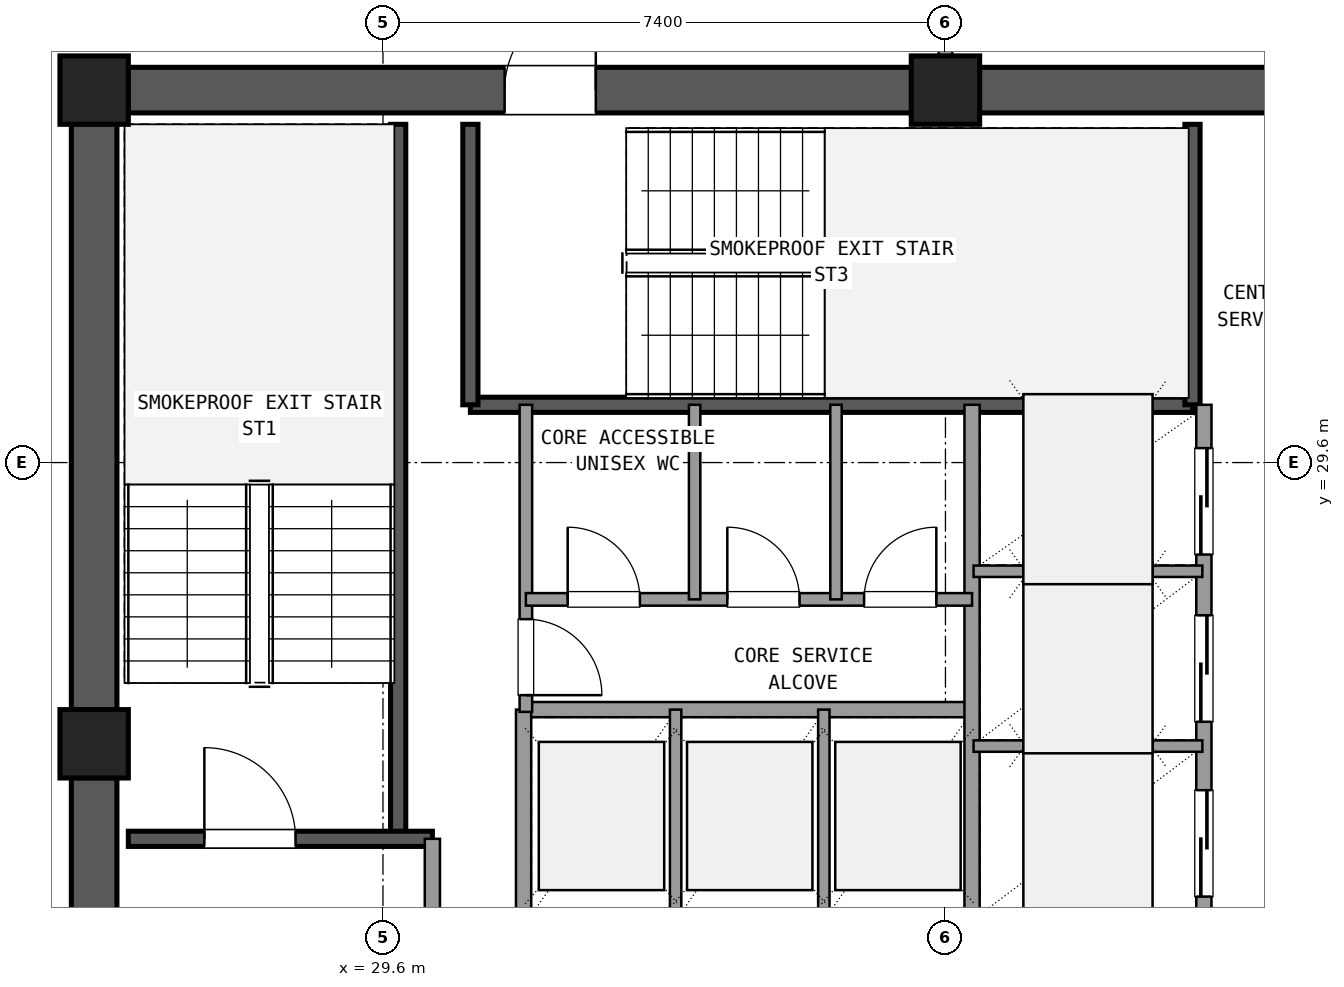
"""IFC4 building model, lengths in metres.
Left out: names, types, materials, properties, quantities, classifications, styles, units other than length and angle.
Written with IfcOpenShell. Run it as: python <this file> out.ifc"""

import sys

from ifc_helpers import new_model, si_unit, direction, frame, frame_2d, origin, origin_2d, place, context, subcontext, project, spatial, rectangle, extrude, element, fill, save


model = new_model("IFC4")
c1 = context("Model", 3, precision=1e-05, world=origin(), true_north=direction((0.0, 1.0)))
c2 = subcontext(c1, "Body", "Model", "MODEL_VIEW")
j1 = project(units=[si_unit("LENGTHUNIT", "METRE"), si_unit("PLANEANGLEUNIT", "RADIAN")], contexts=[c1])
p1 = place(None, origin())
s1 = spatial("IfcSite", under=j1, at=p1, CompositionType="ELEMENT")
p2 = place(p1, origin())
s2 = spatial("IfcBuilding", under=s1, at=p2, CompositionType="ELEMENT")
p3 = place(p2, frame((0.0, 0.0, 217.98)))
s3 = spatial("IfcBuildingStorey", under=s2, at=p3, CompositionType="ELEMENT", Elevation=217.98)
for number, where, z_axis, x_axis in (
    (1, (37.0, 34.5, 0.0), (0.0, 0.0, 1.0), (1.0, 0.0, 0.0)),
    (2, (25.8, 34.5, 0.0), (0.0, 0.0, 1.0), (1.0, 0.0, 0.0)),
    (3, (25.8, 25.9, 0.0), (0.0, 0.0, 1.0), (1.0, 0.0, 0.0)),
):
    element("IfcColumn", number, at=place(p3, frame(where, z_axis=z_axis, x_axis=x_axis)), inside=s3, PredefinedType="COLUMN", context=c2, shape_type="SweptSolid", body=[
        extrude(rectangle(XDim=0.9, YDim=0.9, at=origin_2d()), origin(), (0.0, 0.0, 1.0), 3.6),
    ])
p4 = place(p3, frame((47.755, 34.5, 0.0), z_axis=(0.0, 0.0, 1.0), x_axis=(-1.0, 0.0, 0.0)))
e4 = element("IfcWall", 4, at=p4, inside=s3, PredefinedType="SHEAR", context=c2, shape_type="SweptSolid", body=[
    extrude(rectangle(XDim=10.31, YDim=0.6, at=frame_2d((5.155, 0.0))), origin(), (0.0, 0.0, 1.0), 3.32),
])
p5 = place(p4, frame((4.655, 0.0, 0.0)))
e5 = element("IfcOpeningElement", 5, at=p5, cuts=e4, PredefinedType="OPENING", context=c2, shape_type="SweptSolid", body=[
    extrude(rectangle(XDim=1.6, YDim=2.2, at=frame_2d((0.8, 1.1))), frame((0.0, 0.31, 0.0), z_axis=(0.0, -1.0, 0.0), x_axis=(1.0, 0.0, 0.0)), (0.0, 0.0, 1.0), 0.62),
])
p6 = place(p3, frame((36.555, 34.5, 0.0), z_axis=(0.0, 0.0, 1.0), x_axis=(-1.0, 0.0, 0.0)))
e6 = element("IfcWall", 6, at=p6, inside=s3, PredefinedType="SHEAR", context=c2, shape_type="SweptSolid", body=[
    extrude(rectangle(XDim=10.31, YDim=0.6, at=frame_2d((5.155, 0.0))), origin(), (0.0, 0.0, 1.0), 3.32),
])
p7 = place(p6, frame((4.155, 0.0, 0.0)))
e7 = element("IfcOpeningElement", 7, at=p7, cuts=e6, PredefinedType="OPENING", context=c2, shape_type="SweptSolid", body=[
    extrude(rectangle(XDim=1.2, YDim=2.15, at=frame_2d((0.6, 1.075))), frame((0.0, 0.31, 0.0), z_axis=(0.0, -1.0, 0.0), x_axis=(1.0, 0.0, 0.0)), (0.0, 0.0, 1.0), 0.62),
])
p8 = place(p3, frame((25.8, 34.055, 0.0), z_axis=(0.0, 0.0, 1.0), x_axis=(0.0, -1.0, 0.0)))
e8 = element("IfcWall", 8, at=p8, inside=s3, PredefinedType="SHEAR", context=c2, shape_type="SweptSolid", body=[
    extrude(rectangle(XDim=7.71, YDim=0.6, at=frame_2d((3.855, 0.0))), origin(), (0.0, 0.0, 1.0), 3.32),
])
p9 = place(p3, frame((25.8, 25.455, 0.0), z_axis=(0.0, 0.0, 1.0), x_axis=(0.0, -1.0, 0.0)))
e9 = element("IfcWall", 9, at=p9, inside=s3, PredefinedType="SHEAR", context=c2, shape_type="SweptSolid", body=[
    extrude(rectangle(XDim=7.71, YDim=0.6, at=frame_2d((3.855, 0.0))), origin(), (0.0, 0.0, 1.0), 3.32),
])
p10 = place(p9, frame((2.205, 0.0, 0.0)))
e10 = element("IfcOpeningElement", 10, at=p10, cuts=e9, PredefinedType="OPENING", context=c2, shape_type="SweptSolid", body=[
    extrude(rectangle(XDim=1.2, YDim=2.15, at=frame_2d((0.6, 1.075))), frame((0.0, 0.31, 0.0), z_axis=(0.0, -1.0, 0.0), x_axis=(1.0, 0.0, 0.0)), (0.0, 0.0, 1.0), 0.62),
])
p11 = place(p3, frame((29.8, 24.65, 0.0), z_axis=(0.0, 0.0, 1.0), x_axis=(0.0, 1.0, 0.0)))
e11 = element("IfcWall", 11, at=p11, inside=s3, PredefinedType="SHEAR", context=c2, shape_type="SweptSolid", body=[
    extrude(rectangle(XDim=9.4, YDim=0.2, at=frame_2d((4.7, 0.0))), origin(), (0.0, 0.0, 1.0), 3.32),
])
p12 = place(p3, frame((26.25, 24.65, 0.0), z_axis=(0.0, 0.0, 1.0), x_axis=(1.0, 0.0, 0.0)))
e12 = element("IfcWall", 12, at=p12, inside=s3, PredefinedType="SHEAR", context=c2, shape_type="SweptSolid", body=[
    extrude(rectangle(XDim=4.0, YDim=0.2, at=frame_2d((2.0, 0.0))), origin(), (0.0, 0.0, 1.0), 3.32),
])
p13 = place(p12, frame((1.0, 0.0, 0.0)))
e13 = element("IfcOpeningElement", 13, at=p13, cuts=e12, PredefinedType="OPENING", context=c2, shape_type="SweptSolid", body=[
    extrude(rectangle(XDim=1.2, YDim=2.15, at=frame_2d((0.6, 1.075))), frame((0.0, 0.11, 0.0), z_axis=(0.0, -1.0, 0.0), x_axis=(1.0, 0.0, 0.0)), (0.0, 0.0, 1.0), 0.22),
])
p14 = place(p3, frame((30.75, 30.36, 0.0), z_axis=(0.0, 0.0, 1.0), x_axis=(1.0, 0.0, 0.0)))
e14 = element("IfcWall", 14, at=p14, inside=s3, PredefinedType="SHEAR", context=c2, shape_type="SweptSolid", body=[
    extrude(rectangle(XDim=9.5, YDim=0.2, at=frame_2d((4.75, 0.0))), origin(), (0.0, 0.0, 1.0), 3.32),
])
for number, where, z_axis, x_axis in (
    (15, (30.75, 30.36, 0.0), (0.0, 0.0, 1.0), (0.0, 1.0, 0.0)),
    (16, (40.25, 30.36, 0.0), (0.0, 0.0, 1.0), (0.0, 1.0, 0.0)),
):
    element("IfcWall", number, at=place(p3, frame(where, z_axis=z_axis, x_axis=x_axis)), inside=s3, PredefinedType="SHEAR", context=c2, shape_type="SweptSolid", body=[
        extrude(rectangle(XDim=3.69, YDim=0.2, at=frame_2d((1.845, 0.0))), origin(), (0.0, 0.0, 1.0), 3.32),
    ])
p15 = place(p3, frame((30.25, 17.75, 0.0), z_axis=(0.0, 0.0, 1.0), x_axis=(0.0, 1.0, 0.0)))
e17 = element("IfcWall", 17, at=p15, inside=s3, PredefinedType="SOLIDWALL", context=c2, shape_type="SweptSolid", body=[
    extrude(rectangle(XDim=6.9, YDim=0.2, at=frame_2d((3.45, 0.0))), origin(), (0.0, 0.0, 1.0), 2.61),
])
p16 = place(p15, frame((4.15, 0.0, 0.0)))
e18 = element("IfcOpeningElement", 18, at=p16, cuts=e17, PredefinedType="OPENING", context=c2, shape_type="SweptSolid", body=[
    extrude(rectangle(XDim=1.2, YDim=2.15, at=frame_2d((0.6, 1.075))), frame((0.0, 0.11, 0.0), z_axis=(0.0, -1.0, 0.0), x_axis=(1.0, 0.0, 0.0)), (0.0, 0.0, 1.0), 0.22),
])
p17 = place(p3, frame((31.45, 26.35, 0.0), z_axis=(0.0, 0.0, 1.0), x_axis=(1.0, 0.0, 0.0)))
e19 = element("IfcWall", 19, at=p17, inside=s3, PredefinedType="SOLIDWALL", context=c2, shape_type="SweptSolid", body=[
    extrude(rectangle(XDim=5.9, YDim=0.2, at=frame_2d((2.95, 0.0))), origin(), (0.0, 0.0, 1.0), 2.61),
])
p18 = place(p3, frame((31.45, 23.54, 0.0), z_axis=(0.0, 0.0, 1.0), x_axis=(0.0, 1.0, 0.0)))
e20 = element("IfcWall", 20, at=p18, inside=s3, PredefinedType="SOLIDWALL", context=c2, shape_type="SweptSolid", body=[
    extrude(rectangle(XDim=2.81, YDim=0.2, at=frame_2d((1.405, 0.0))), origin(), (0.0, 0.0, 1.0), 2.61),
])
for number, where, z_axis, x_axis in (
    (21, (33.45, 23.54, 0.0), (0.0, 0.0, 1.0), (0.0, 1.0, 0.0)),
    (22, (35.4, 23.54, 0.0), (0.0, 0.0, 1.0), (0.0, 1.0, 0.0)),
):
    element("IfcWall", number, at=place(p3, frame(where, z_axis=z_axis, x_axis=x_axis)), inside=s3, PredefinedType="PARTITIONING", context=c2, shape_type="SweptSolid", body=[
        extrude(rectangle(XDim=2.81, YDim=0.15, at=frame_2d((1.405, 0.0))), origin(), (0.0, 0.0, 1.0), 2.61),
    ])
p19 = place(p3, frame((37.35, 23.54, 0.0), z_axis=(0.0, 0.0, 1.0), x_axis=(0.0, 1.0, 0.0)))
e23 = element("IfcWall", 23, at=p19, inside=s3, PredefinedType="SOLIDWALL", context=c2, shape_type="SweptSolid", body=[
    extrude(rectangle(XDim=6.82, YDim=0.2, at=frame_2d((3.41, 0.0))), origin(), (0.0, 0.0, 1.0), 2.61),
])
p20 = place(p3, frame((40.4, 23.54, 0.0), z_axis=(0.0, 0.0, 1.0), x_axis=(0.0, 1.0, 0.0)))
e24 = element("IfcWall", 24, at=p20, inside=s3, PredefinedType="SOLIDWALL", context=c2, shape_type="SweptSolid", body=[
    extrude(rectangle(XDim=6.82, YDim=0.2, at=frame_2d((3.41, 0.0))), origin(), (0.0, 0.0, 1.0), 2.61),
])
p21 = place(p20, frame((0.35, 0.0, 0.0)))
e25 = element("IfcOpeningElement", 25, at=p21, cuts=e24, PredefinedType="OPENING", context=c2, shape_type="SweptSolid", body=[
    extrude(rectangle(XDim=1.4, YDim=2.2, at=frame_2d((0.7, 1.1))), frame((0.0, 0.11, 0.0), z_axis=(0.0, -1.0, 0.0), x_axis=(1.0, 0.0, 0.0)), (0.0, 0.0, 1.0), 0.22),
])
p22 = place(p20, frame((2.65, 0.0, 0.0)))
e26 = element("IfcOpeningElement", 26, at=p22, cuts=e24, PredefinedType="OPENING", context=c2, shape_type="SweptSolid", body=[
    extrude(rectangle(XDim=1.4, YDim=2.2, at=frame_2d((0.7, 1.1))), frame((0.0, 0.11, 0.0), z_axis=(0.0, -1.0, 0.0), x_axis=(1.0, 0.0, 0.0)), (0.0, 0.0, 1.0), 0.22),
])
p23 = place(p20, frame((4.85, 0.0, 0.0)))
e27 = element("IfcOpeningElement", 27, at=p23, cuts=e24, PredefinedType="OPENING", context=c2, shape_type="SweptSolid", body=[
    extrude(rectangle(XDim=1.4, YDim=2.2, at=frame_2d((0.7, 1.1))), frame((0.0, 0.11, 0.0), z_axis=(0.0, -1.0, 0.0), x_axis=(1.0, 0.0, 0.0)), (0.0, 0.0, 1.0), 0.22),
])
for number, where, z_axis, x_axis in (
    (28, (37.37, 25.87, 0.0), (0.0, 0.0, 1.0), (1.0, 0.0, 0.0)),
    (29, (37.37, 28.17, 0.0), (0.0, 0.0, 1.0), (1.0, 0.0, 0.0)),
):
    element("IfcWall", number, at=place(p3, frame(where, z_axis=z_axis, x_axis=x_axis)), inside=s3, PredefinedType="PARTITIONING", context=c2, shape_type="SweptSolid", body=[
        extrude(rectangle(XDim=3.01, YDim=0.15, at=frame_2d((1.505, 0.0))), origin(), (0.0, 0.0, 1.0), 2.61),
    ])
p24 = place(p3, frame((31.48, 26.32, 0.0), z_axis=(0.0, 0.0, 1.0), x_axis=(0.0, 1.0, 0.0)))
e30 = element("IfcWall", 30, at=p24, inside=s3, PredefinedType="PLUMBINGWALL", context=c2, shape_type="SweptSolid", body=[
    extrude(rectangle(XDim=4.04, YDim=0.165, at=frame_2d((2.02, 0.0))), origin(), (0.0, 0.0, 1.0), 2.61),
])
p25 = place(p24, frame((0.22, 0.0, 0.0)))
e31 = element("IfcOpeningElement", 31, at=p25, cuts=e30, PredefinedType="OPENING", context=c2, shape_type="SweptSolid", body=[
    extrude(rectangle(XDim=1.0, YDim=2.15, at=frame_2d((0.5, 1.075))), frame((0.0, 0.093, 0.0), z_axis=(0.0, -1.0, 0.0), x_axis=(1.0, 0.0, 0.0)), (0.0, 0.0, 1.0), 0.185),
])
p26 = place(p3, frame((31.48, 27.8, 0.0), z_axis=(0.0, 0.0, 1.0), x_axis=(1.0, 0.0, 0.0)))
e32 = element("IfcWall", 32, at=p26, inside=s3, PredefinedType="PLUMBINGWALL", context=c2, shape_type="SweptSolid", body=[
    extrude(rectangle(XDim=5.87, YDim=0.165, at=frame_2d((2.935, 0.0))), origin(), (0.0, 0.0, 1.0), 2.61),
])
p27 = place(p26, frame((0.55, 0.0, 0.0)))
e33 = element("IfcOpeningElement", 33, at=p27, cuts=e32, PredefinedType="OPENING", context=c2, shape_type="SweptSolid", body=[
    extrude(rectangle(XDim=0.95, YDim=2.1, at=frame_2d((0.475, 1.05))), frame((0.0, 0.093, 0.0), z_axis=(0.0, -1.0, 0.0), x_axis=(1.0, 0.0, 0.0)), (0.0, 0.0, 1.0), 0.185),
])
p28 = place(p26, frame((2.65, 0.0, 0.0)))
e34 = element("IfcOpeningElement", 34, at=p28, cuts=e32, PredefinedType="OPENING", context=c2, shape_type="SweptSolid", body=[
    extrude(rectangle(XDim=0.95, YDim=2.1, at=frame_2d((0.475, 1.05))), frame((0.0, 0.093, 0.0), z_axis=(0.0, -1.0, 0.0), x_axis=(1.0, 0.0, 0.0)), (0.0, 0.0, 1.0), 0.185),
])
p29 = place(p26, frame((4.45, 0.0, 0.0)))
e35 = element("IfcOpeningElement", 35, at=p29, cuts=e32, PredefinedType="OPENING", context=c2, shape_type="SweptSolid", body=[
    extrude(rectangle(XDim=0.95, YDim=2.1, at=frame_2d((0.475, 1.05))), frame((0.0, 0.093, 0.0), z_axis=(0.0, -1.0, 0.0), x_axis=(1.0, 0.0, 0.0)), (0.0, 0.0, 1.0), 0.185),
])
for number, where, z_axis, x_axis in (
    (36, (33.7, 27.8, 0.0), (0.0, 0.0, 1.0), (0.0, 1.0, 0.0)),
    (37, (35.56, 27.8, 0.0), (0.0, 0.0, 1.0), (0.0, 1.0, 0.0)),
):
    element("IfcWall", number, at=place(p3, frame(where, z_axis=z_axis, x_axis=x_axis)), inside=s3, PredefinedType="PARTITIONING", context=c2, shape_type="SweptSolid", body=[
        extrude(rectangle(XDim=2.56, YDim=0.15, at=frame_2d((1.28, 0.0))), origin(), (0.0, 0.0, 1.0), 2.61),
    ])
p30 = place(p3, frame((37.0, 34.95, 0.0), z_axis=(0.0, 0.0, 1.0), x_axis=(0.0, 1.0, 0.0)))
e38 = element("IfcWall", 38, at=p30, inside=s3, PredefinedType="PARTITIONING", context=c2, shape_type="SweptSolid", body=[
    extrude(rectangle(XDim=2.7, YDim=0.18, at=frame_2d((1.35, 0.0))), origin(), (0.0, 0.0, 1.0), 2.61),
])
p31 = place(p30, frame((0.35, 0.0, 0.0)))
e39 = element("IfcOpeningElement", 39, at=p31, cuts=e38, PredefinedType="OPENING", context=c2, shape_type="SweptSolid", body=[
    extrude(rectangle(XDim=2.0, YDim=2.2, at=frame_2d((1.0, 1.1))), frame((0.0, 0.1, 0.0), z_axis=(0.0, -1.0, 0.0), x_axis=(1.0, 0.0, 0.0)), (0.0, 0.0, 1.0), 0.2),
])
p32 = place(p13, origin())
e40 = element("IfcDoor", 40, at=p32, inside=s3, OperationType="SINGLE_SWING_LEFT", PredefinedType="DOOR", context=c2, shape_type="SweptSolid", body=[
    extrude(rectangle(XDim=1.2, YDim=2.15, at=frame_2d((0.6, 1.075))), frame((0.0, 0.025, 0.0), z_axis=(0.0, -1.0, 0.0), x_axis=(1.0, 0.0, 0.0)), (0.0, 0.0, 1.0), 0.05),
])
fill(e13, e40)
p33 = place(p7, frame((1.2, 0.0, 0.0), z_axis=(0.0, 0.0, 1.0), x_axis=(-1.0, 0.0, 0.0)))
e41 = element("IfcDoor", 41, at=p33, inside=s3, OperationType="SINGLE_SWING_LEFT", PredefinedType="DOOR", context=c2, shape_type="SweptSolid", body=[
    extrude(rectangle(XDim=1.2, YDim=2.15, at=frame_2d((0.6, 1.075))), frame((0.0, 0.025, 0.0), z_axis=(0.0, -1.0, 0.0), x_axis=(1.0, 0.0, 0.0)), (0.0, 0.0, 1.0), 0.05),
])
fill(e7, e41)
p34 = place(p21, origin())
e42 = element("IfcDoor", 42, at=p34, inside=s3, OperationType="SLIDING_TO_LEFT", PredefinedType="DOOR", context=c2, shape_type="SweptSolid", body=[
    extrude(rectangle(XDim=1.4, YDim=2.2, at=frame_2d((0.7, 1.1))), frame((0.0, 0.025, 0.0), z_axis=(0.0, -1.0, 0.0), x_axis=(1.0, 0.0, 0.0)), (0.0, 0.0, 1.0), 0.05),
])
fill(e25, e42)
p35 = place(p22, origin())
e43 = element("IfcDoor", 43, at=p35, inside=s3, OperationType="SLIDING_TO_LEFT", PredefinedType="DOOR", context=c2, shape_type="SweptSolid", body=[
    extrude(rectangle(XDim=1.4, YDim=2.2, at=frame_2d((0.7, 1.1))), frame((0.0, 0.025, 0.0), z_axis=(0.0, -1.0, 0.0), x_axis=(1.0, 0.0, 0.0)), (0.0, 0.0, 1.0), 0.05),
])
fill(e26, e43)
p36 = place(p23, origin())
e44 = element("IfcDoor", 44, at=p36, inside=s3, OperationType="SLIDING_TO_RIGHT", PredefinedType="DOOR", context=c2, shape_type="SweptSolid", body=[
    extrude(rectangle(XDim=1.4, YDim=2.2, at=frame_2d((0.7, 1.1))), frame((0.0, 0.025, 0.0), z_axis=(0.0, -1.0, 0.0), x_axis=(1.0, 0.0, 0.0)), (0.0, 0.0, 1.0), 0.05),
])
fill(e27, e44)
p37 = place(p25, frame((1.0, 0.0, 0.0), z_axis=(0.0, 0.0, 1.0), x_axis=(-1.0, 0.0, 0.0)))
e45 = element("IfcDoor", 45, at=p37, inside=s3, OperationType="SINGLE_SWING_LEFT", PredefinedType="DOOR", context=c2, shape_type="SweptSolid", body=[
    extrude(rectangle(XDim=1.0, YDim=2.15, at=frame_2d((0.5, 1.075))), frame((0.0, 0.025, 0.0), z_axis=(0.0, -1.0, 0.0), x_axis=(1.0, 0.0, 0.0)), (0.0, 0.0, 1.0), 0.05),
])
fill(e31, e45)
p38 = place(p27, origin())
e46 = element("IfcDoor", 46, at=p38, inside=s3, OperationType="SINGLE_SWING_LEFT", PredefinedType="DOOR", context=c2, shape_type="SweptSolid", body=[
    extrude(rectangle(XDim=0.95, YDim=2.1, at=frame_2d((0.475, 1.05))), frame((0.0, 0.025, 0.0), z_axis=(0.0, -1.0, 0.0), x_axis=(1.0, 0.0, 0.0)), (0.0, 0.0, 1.0), 0.05),
])
fill(e33, e46)
p39 = place(p28, origin())
e47 = element("IfcDoor", 47, at=p39, inside=s3, OperationType="SINGLE_SWING_LEFT", PredefinedType="DOOR", context=c2, shape_type="SweptSolid", body=[
    extrude(rectangle(XDim=0.95, YDim=2.1, at=frame_2d((0.475, 1.05))), frame((0.0, 0.025, 0.0), z_axis=(0.0, -1.0, 0.0), x_axis=(1.0, 0.0, 0.0)), (0.0, 0.0, 1.0), 0.05),
])
fill(e34, e47)
p40 = place(p29, origin())
e48 = element("IfcDoor", 48, at=p40, inside=s3, OperationType="SINGLE_SWING_RIGHT", PredefinedType="DOOR", context=c2, shape_type="SweptSolid", body=[
    extrude(rectangle(XDim=0.95, YDim=2.1, at=frame_2d((0.475, 1.05))), frame((0.0, 0.025, 0.0), z_axis=(0.0, -1.0, 0.0), x_axis=(1.0, 0.0, 0.0)), (0.0, 0.0, 1.0), 0.05),
])
fill(e35, e48)
save(model, sys.argv[1])
